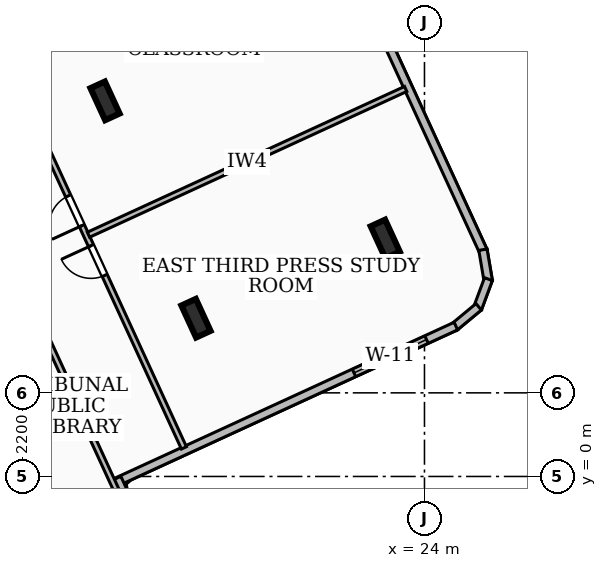
"""IFC4 building model, lengths in metres.
Left out: names, types, materials, properties, quantities, classifications, styles, units other than length and angle.
Written with IfcOpenShell. Run it as: python <this file> out.ifc"""

import sys

from ifc_helpers import new_model, si_unit, direction, frame, frame_2d, origin, origin_2d, place, context, subcontext, project, spatial, rectangle, i_section, extrude, element, fill, save


model = new_model("IFC4")
c1 = context("Model", 3, precision=1e-05, world=origin(), true_north=direction((0.0, 1.0)))
c2 = subcontext(c1, "Body", "Model", "MODEL_VIEW")
j1 = project(units=[si_unit("LENGTHUNIT", "METRE"), si_unit("PLANEANGLEUNIT", "RADIAN")], contexts=[c1])
p1 = place(None, origin())
s1 = spatial("IfcSite", under=j1, at=p1, CompositionType="ELEMENT")
p2 = place(p1, origin())
s2 = spatial("IfcBuilding", under=s1, at=p2, CompositionType="ELEMENT")
p3 = place(p2, frame((0.0, 0.0, 184.68)))
s3 = spatial("IfcBuildingStorey", under=s2, at=p3, CompositionType="ELEMENT", Elevation=184.68)
for number, where, z_axis, x_axis in (
    (1, (17.987, 4.164, 0.0), (0.0, 0.0, 1.0), (0.909, 0.418, 0.0)),
    (2, (15.594, 9.883, 0.0), (0.0, 0.0, 1.0), (0.909, 0.418, 0.0)),
    (3, (22.968, 6.248, 0.0), (0.0, 0.0, 1.0), (0.909, 0.418, 0.0)),
):
    element("IfcColumn", number, at=place(p3, frame(where, z_axis=z_axis, x_axis=x_axis)), inside=s3, PredefinedType="COLUMN", context=c2, shape_type="SweptSolid", body=[
        extrude(i_section(OverallWidth=0.418, OverallDepth=0.927, WebThickness=0.019, FlangeThickness=0.032, at=origin_2d()), origin(), (0.0, 0.0, 1.0), 3.6),
    ])
p4 = place(p3, frame((21.335, 15.098, 0.0), z_axis=(0.0, 0.0, 1.0), x_axis=(0.417474282076, -0.90868873868, 0.0)))
e4 = element("IfcWall", 4, at=p4, inside=s3, PredefinedType="SOLIDWALL", context=c2, shape_type="SweptSolid", body=[
    extrude(rectangle(XDim=10.101, YDim=0.22, at=frame_2d((5.051, 0.0))), origin(), (0.0, 0.0, 1.0), 2.332),
])
p5 = place(p3, frame((25.538, 5.967, 0.0), z_axis=(0.0, 0.0, 1.0), x_axis=(0.167575597201, -0.985859228908, 0.0)))
e5 = element("IfcWall", 5, at=p5, inside=s3, PredefinedType="SOLIDWALL", context=c2, shape_type="SweptSolid", body=[
    extrude(rectangle(XDim=0.835, YDim=0.22, at=frame_2d((0.417, 0.0))), origin(), (0.0, 0.0, 1.0), 3.34),
])
p6 = place(p3, frame((25.683, 5.192, 0.0), z_axis=(0.0, 0.0, 1.0), x_axis=(-0.348538641681, -0.937294412261, 0.0)))
e6 = element("IfcWall", 6, at=p6, inside=s3, PredefinedType="SOLIDWALL", context=c2, shape_type="SweptSolid", body=[
    extrude(rectangle(XDim=0.818, YDim=0.22, at=frame_2d((0.409, 0.0))), origin(), (0.0, 0.0, 1.0), 3.34),
])
p7 = place(p3, frame((25.426, 4.464, 0.0), z_axis=(0.0, 0.0, 1.0), x_axis=(-0.769323077261, -0.638859924235, 0.0)))
e7 = element("IfcWall", 7, at=p7, inside=s3, PredefinedType="SOLIDWALL", context=c2, shape_type="SweptSolid", body=[
    extrude(rectangle(XDim=0.835, YDim=0.22, at=frame_2d((0.417, 0.0))), origin(), (0.0, 0.0, 1.0), 3.34),
])
p8 = place(p3, frame((24.826, 3.957, 0.0), z_axis=(0.0, 0.0, 1.0), x_axis=(-0.908672019386, -0.41751067194, 0.0)))
e8 = element("IfcWall", 8, at=p8, inside=s3, PredefinedType="SOLIDWALL", context=c2, shape_type="SweptSolid", body=[
    extrude(rectangle(XDim=9.858, YDim=0.22, at=frame_2d((4.929, 0.0))), origin(), (0.0, 0.0, 1.0), 3.34),
])
p9 = place(p8, frame((0.85, 0.0, 0.85)))
e9 = element("IfcOpeningElement", 9, at=p9, cuts=e8, PredefinedType="OPENING", context=c2, shape_type="SweptSolid", body=[
    extrude(rectangle(XDim=2.1, YDim=1.6, at=frame_2d((1.05, 0.8))), frame((0.0, 0.12, 0.0), z_axis=(0.0, -1.0, 0.0), x_axis=(1.0, 0.0, 0.0)), (0.0, 0.0, 1.0), 0.24),
])
p10 = place(p3, frame((15.911, -0.042, 0.0), z_axis=(0.0, 0.0, 1.0), x_axis=(0.417479344719, -0.908686412759, 0.0)))
e10 = element("IfcWall", 10, at=p10, inside=s3, PredefinedType="SOLIDWALL", context=c2, shape_type="SweptSolid", body=[
    extrude(rectangle(XDim=6.278, YDim=0.22, at=frame_2d((3.139, 0.0))), origin(), (0.0, 0.0, 1.0), 3.34),
])
p11 = place(p3, frame((8.6, 15.508, 0.0), z_axis=(0.0, 0.0, 1.0), x_axis=(0.41757132443, -0.908644148726, 0.0)))
e11 = element("IfcWall", 11, at=p11, inside=s3, PredefinedType="PARTITIONING", context=c2, shape_type="SweptSolid", body=[
    extrude(rectangle(XDim=20.521, YDim=0.145, at=frame_2d((10.26, 0.0))), origin(), (0.0, 0.0, 1.0), 2.644),
])
p12 = place(p11, frame((9.9, 0.0, 0.0)))
e12 = element("IfcOpeningElement", 12, at=p12, cuts=e11, PredefinedType="OPENING", context=c2, shape_type="SweptSolid", body=[
    extrude(rectangle(XDim=1.2, YDim=2.1, at=frame_2d((0.6, 1.05))), frame((0.0, 0.083, 0.0), z_axis=(0.0, -1.0, 0.0), x_axis=(1.0, 0.0, 0.0)), (0.0, 0.0, 1.0), 0.165),
])
p13 = place(p3, frame((15.159, 6.361, 0.0), z_axis=(0.0, 0.0, 1.0), x_axis=(0.908662943876, 0.417530423355, 0.0)))
e13 = element("IfcWall", 13, at=p13, inside=s3, PredefinedType="PARTITIONING", context=c2, shape_type="SweptSolid", body=[
    extrude(rectangle(XDim=9.185, YDim=0.145, at=frame_2d((4.592, 0.0))), origin(), (0.0, 0.0, 1.0), 3.34),
])
p14 = place(p3, frame((17.67, 0.752, 0.0), z_axis=(0.0, 0.0, 1.0), x_axis=(-0.41749974953, 0.908677037864, 0.0)))
e14 = element("IfcWall", 14, at=p14, inside=s3, PredefinedType="PARTITIONING", context=c2, shape_type="SweptSolid", body=[
    extrude(rectangle(XDim=12.91, YDim=0.145, at=frame_2d((6.455, 0.0))), origin(), (0.0, 0.0, 1.0), 2.644),
])
p15 = place(p14, frame((4.995, 0.0, 0.0)))
e15 = element("IfcOpeningElement", 15, at=p15, cuts=e14, PredefinedType="OPENING", context=c2, shape_type="SweptSolid", body=[
    extrude(rectangle(XDim=0.86, YDim=2.04, at=frame_2d((0.43, 1.02))), frame((0.0, 0.083, 0.0), z_axis=(0.0, -1.0, 0.0), x_axis=(1.0, 0.0, 0.0)), (0.0, 0.0, 1.0), 0.165),
])
p16 = place(p14, frame((6.435, 0.0, 0.0)))
e16 = element("IfcOpeningElement", 16, at=p16, cuts=e14, PredefinedType="OPENING", context=c2, shape_type="SweptSolid", body=[
    extrude(rectangle(XDim=0.86, YDim=2.04, at=frame_2d((0.43, 1.02))), frame((0.0, 0.083, 0.0), z_axis=(0.0, -1.0, 0.0), x_axis=(1.0, 0.0, 0.0)), (0.0, 0.0, 1.0), 0.165),
])
p17 = place(p9, origin())
e17 = element("IfcWindow", 17, at=p17, inside=s3, PartitioningType="SINGLE_PANEL", PredefinedType="WINDOW", context=c2, shape_type="SweptSolid", body=[
    extrude(rectangle(XDim=2.1, YDim=1.6, at=frame_2d((1.05, 0.8))), frame((0.0, 0.03, 0.0), z_axis=(0.0, -1.0, 0.0), x_axis=(1.0, 0.0, 0.0)), (0.0, 0.0, 1.0), 0.06),
])
fill(e9, e17)
p18 = place(p15, origin())
e18 = element("IfcDoor", 18, at=p18, inside=s3, OperationType="SINGLE_SWING_RIGHT", PredefinedType="DOOR", context=c2, shape_type="SweptSolid", body=[
    extrude(rectangle(XDim=0.86, YDim=2.04, at=frame_2d((0.43, 1.02))), frame((0.0, 0.025, 0.0), z_axis=(0.0, -1.0, 0.0), x_axis=(1.0, 0.0, 0.0)), (0.0, 0.0, 1.0), 0.05),
])
fill(e15, e18)
p19 = place(p16, origin())
e19 = element("IfcDoor", 19, at=p19, inside=s3, OperationType="SINGLE_SWING_LEFT", PredefinedType="DOOR", context=c2, shape_type="SweptSolid", body=[
    extrude(rectangle(XDim=0.86, YDim=2.04, at=frame_2d((0.43, 1.02))), frame((0.0, 0.025, 0.0), z_axis=(0.0, -1.0, 0.0), x_axis=(1.0, 0.0, 0.0)), (0.0, 0.0, 1.0), 0.05),
])
fill(e16, e19)
save(model, sys.argv[1])
